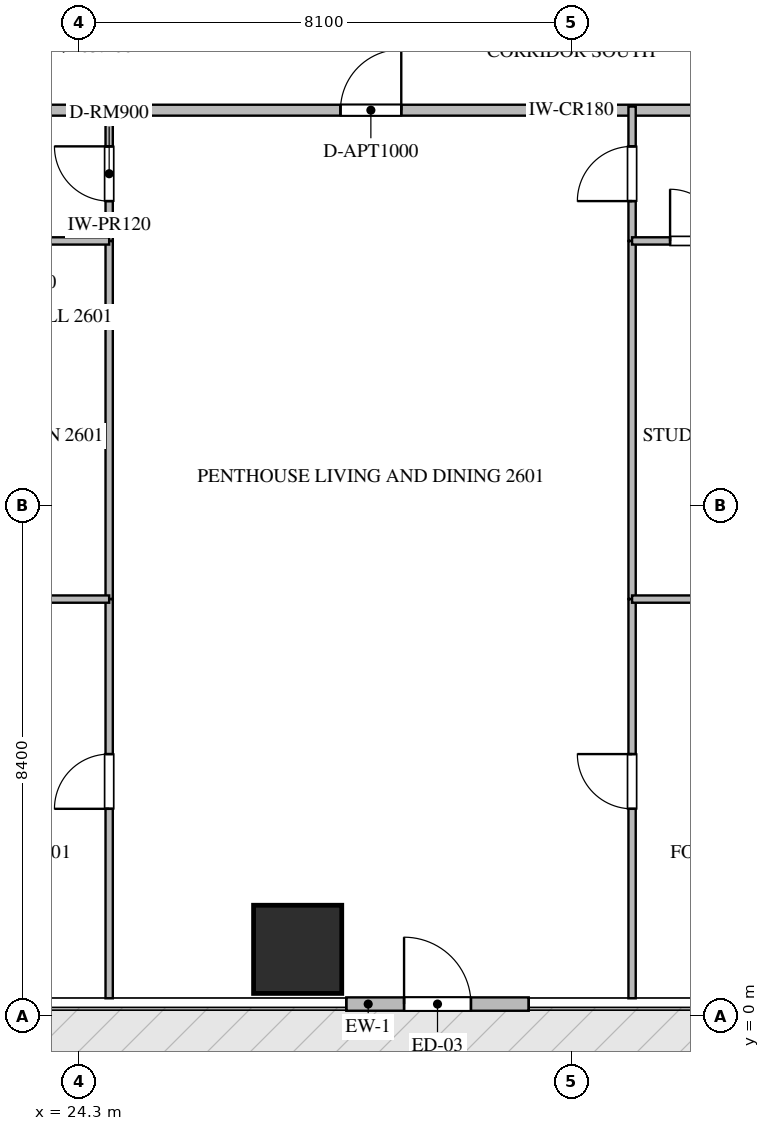
"""IFC4 building model, lengths in metres.
Left out: names, types, materials, properties, quantities, classifications, styles, units other than length and angle.
Written with IfcOpenShell. Run it as: python <this file> out.ifc"""

import sys

from ifc_helpers import new_model, si_unit, direction, frame, frame_2d, origin, origin_2d, place, context, subcontext, project, spatial, rectangle, extrude, source, transform, mapped, element, fill, save


model = new_model("IFC4")
c1 = context("Model", 3, precision=1e-05, world=origin(), true_north=direction((0.0, 1.0)))
c2 = subcontext(c1, "Body", "Model", "MODEL_VIEW")
j1 = project(units=[si_unit("LENGTHUNIT", "METRE"), si_unit("PLANEANGLEUNIT", "RADIAN")], contexts=[c1])
p1 = place(None, origin())
s1 = spatial("IfcSite", under=j1, at=p1, CompositionType="ELEMENT")
p2 = place(p1, origin())
s2 = spatial("IfcBuilding", under=s1, at=p2, CompositionType="ELEMENT")
p3 = place(p2, frame((0.0, 0.0, 105.45)))
s3 = spatial("IfcBuildingStorey", under=s2, at=p3, CompositionType="ELEMENT", Elevation=105.45)
m1 = source(origin(), c2, "Body", "SweptSolid", [
    extrude(rectangle(XDim=1.45, YDim=1.45, at=origin_2d()), origin(), (0.0, 0.0, 1.0), 3.65),
])
p4 = place(p3, frame((27.9, 1.1, -0.26), z_axis=(0.0, 0.0, 1.0), x_axis=(1.0, 0.0, 0.0)))
e1 = element("IfcColumn", 1, at=p4, inside=s3, PredefinedType="COLUMN", context=c2, shape_type="MappedRepresentation", body=[
    mapped(m1, transform((0.0, 0.0, 0.0), scale=1.0)),
])
p5 = place(p3, frame((28.7, 0.2, 0.0), z_axis=(0.0, 0.0, 1.0), x_axis=(1.0, 0.0, 0.0)))
e2 = element("IfcWall", 2, at=p5, inside=s3, PredefinedType="ELEMENTEDWALL", context=c2, shape_type="SweptSolid", body=[
    extrude(rectangle(XDim=3.0, YDim=0.22, at=frame_2d((1.5, 0.0))), origin(), (0.0, 0.0, 1.0), 3.375),
])
p6 = place(p5, frame((0.95, 0.0, 0.0)))
e3 = element("IfcOpeningElement", 3, at=p6, cuts=e2, PredefinedType="OPENING", context=c2, shape_type="SweptSolid", body=[
    extrude(rectangle(XDim=1.1, YDim=2.2, at=frame_2d((0.55, 1.1))), frame((0.0, 0.12, 0.0), z_axis=(0.0, -1.0, 0.0), x_axis=(1.0, 0.0, 0.0)), (0.0, 0.0, 1.0), 0.24),
])
p7 = place(p3, frame((21.402, 14.9, 0.0), z_axis=(0.0, 0.0, 1.0), x_axis=(1.0, 0.0, 0.0)))
e4 = element("IfcWall", 4, at=p7, inside=s3, PredefinedType="PARTITIONING", context=c2, shape_type="SweptSolid", body=[
    extrude(rectangle(XDim=21.996, YDim=0.18, at=frame_2d((10.998, 0.0))), origin(), (0.0, 0.0, 1.0), 3.39),
])
p8 = place(p7, frame((7.202, 0.0, 0.0)))
e5 = element("IfcOpeningElement", 5, at=p8, cuts=e4, PredefinedType="OPENING", context=c2, shape_type="SweptSolid", body=[
    extrude(rectangle(XDim=1.0, YDim=2.15, at=frame_2d((0.5, 1.075))), frame((0.0, 0.1, 0.0), z_axis=(0.0, -1.0, 0.0), x_axis=(1.0, 0.0, 0.0)), (0.0, 0.0, 1.0), 0.2),
])
p9 = place(p3, frame((24.8, 12.75, 0.0), z_axis=(0.0, 0.0, 1.0), x_axis=(0.0, 1.0, 0.0)))
e6 = element("IfcWall", 6, at=p9, inside=s3, PredefinedType="PARTITIONING", context=c2, shape_type="SweptSolid", body=[
    extrude(rectangle(XDim=2.21, YDim=0.12, at=frame_2d((1.105, 0.0))), origin(), (0.0, 0.0, 1.0), 3.39),
])
p10 = place(p9, frame((0.655, 0.0, 0.0)))
e7 = element("IfcOpeningElement", 7, at=p10, cuts=e6, PredefinedType="OPENING", context=c2, shape_type="SweptSolid", body=[
    extrude(rectangle(XDim=0.9, YDim=2.1, at=frame_2d((0.45, 1.05))), frame((0.0, 0.07, 0.0), z_axis=(0.0, -1.0, 0.0), x_axis=(1.0, 0.0, 0.0)), (0.0, 0.0, 1.0), 0.14),
])
p11 = place(p3, frame((24.8, 0.295, 0.0), z_axis=(0.0, 0.0, 1.0), x_axis=(0.0, 1.0, 0.0)))
e8 = element("IfcWall", 8, at=p11, inside=s3, PredefinedType="PARTITIONING", context=c2, shape_type="SweptSolid", body=[
    extrude(rectangle(XDim=6.565, YDim=0.12, at=frame_2d((3.283, 0.0))), origin(), (0.0, 0.0, 1.0), 3.39),
])
p12 = place(p11, frame((3.116, 0.0, 0.0)))
e9 = element("IfcOpeningElement", 9, at=p12, cuts=e8, PredefinedType="OPENING", context=c2, shape_type="SweptSolid", body=[
    extrude(rectangle(XDim=0.9, YDim=2.1, at=frame_2d((0.45, 1.05))), frame((0.0, 0.07, 0.0), z_axis=(0.0, -1.0, 0.0), x_axis=(1.0, 0.0, 0.0)), (0.0, 0.0, 1.0), 0.14),
])
p13 = place(p3, frame((24.8, 6.862, 0.0), z_axis=(0.0, 0.0, 1.0), x_axis=(0.0, 1.0, 0.0)))
e10 = element("IfcWall", 10, at=p13, inside=s3, PredefinedType="PARTITIONING", context=c2, shape_type="SweptSolid", body=[
    extrude(rectangle(XDim=5.886, YDim=0.12, at=frame_2d((2.943, 0.0))), origin(), (0.0, 0.0, 1.0), 3.39),
])
p14 = place(p3, frame((19.65, 6.86, 0.0), z_axis=(0.0, 0.0, 1.0), x_axis=(1.0, 0.0, 0.0)))
e11 = element("IfcWall", 11, at=p14, inside=s3, PredefinedType="PARTITIONING", context=c2, shape_type="SweptSolid", body=[
    extrude(rectangle(XDim=5.15, YDim=0.12, at=frame_2d((2.575, 0.0))), origin(), (0.0, 0.0, 1.0), 3.39),
])
p15 = place(p3, frame((21.752, 12.75, 0.0), z_axis=(0.0, 0.0, 1.0), x_axis=(1.0, 0.0, 0.0)))
e12 = element("IfcWall", 12, at=p15, inside=s3, PredefinedType="PARTITIONING", context=c2, shape_type="SweptSolid", body=[
    extrude(rectangle(XDim=3.048, YDim=0.12, at=frame_2d((1.524, 0.0))), origin(), (0.0, 0.0, 1.0), 3.39),
])
p16 = place(p15, frame((1.099, 0.0, 0.0)))
e13 = element("IfcOpeningElement", 13, at=p16, cuts=e12, PredefinedType="OPENING", context=c2, shape_type="SweptSolid", body=[
    extrude(rectangle(XDim=0.85, YDim=2.1, at=frame_2d((0.425, 1.05))), frame((0.0, 0.07, 0.0), z_axis=(0.0, -1.0, 0.0), x_axis=(1.0, 0.0, 0.0)), (0.0, 0.0, 1.0), 0.14),
])
p17 = place(p3, frame((33.4, 12.75, 0.0), z_axis=(0.0, 0.0, 1.0), x_axis=(0.0, 1.0, 0.0)))
e14 = element("IfcWall", 14, at=p17, inside=s3, PredefinedType="PARTITIONING", context=c2, shape_type="SweptSolid", body=[
    extrude(rectangle(XDim=2.21, YDim=0.12, at=frame_2d((1.105, 0.0))), origin(), (0.0, 0.0, 1.0), 3.39),
])
p18 = place(p17, frame((0.655, 0.0, 0.0)))
e15 = element("IfcOpeningElement", 15, at=p18, cuts=e14, PredefinedType="OPENING", context=c2, shape_type="SweptSolid", body=[
    extrude(rectangle(XDim=0.9, YDim=2.1, at=frame_2d((0.45, 1.05))), frame((0.0, 0.07, 0.0), z_axis=(0.0, -1.0, 0.0), x_axis=(1.0, 0.0, 0.0)), (0.0, 0.0, 1.0), 0.14),
])
p19 = place(p3, frame((33.4, 0.295, 0.0), z_axis=(0.0, 0.0, 1.0), x_axis=(0.0, 1.0, 0.0)))
e16 = element("IfcWall", 16, at=p19, inside=s3, PredefinedType="PARTITIONING", context=c2, shape_type="SweptSolid", body=[
    extrude(rectangle(XDim=6.565, YDim=0.12, at=frame_2d((3.283, 0.0))), origin(), (0.0, 0.0, 1.0), 3.39),
])
p20 = place(p19, frame((3.116, 0.0, 0.0)))
e17 = element("IfcOpeningElement", 17, at=p20, cuts=e16, PredefinedType="OPENING", context=c2, shape_type="SweptSolid", body=[
    extrude(rectangle(XDim=0.9, YDim=2.1, at=frame_2d((0.45, 1.05))), frame((0.0, 0.07, 0.0), z_axis=(0.0, -1.0, 0.0), x_axis=(1.0, 0.0, 0.0)), (0.0, 0.0, 1.0), 0.14),
])
p21 = place(p3, frame((33.4, 6.862, 0.0), z_axis=(0.0, 0.0, 1.0), x_axis=(0.0, 1.0, 0.0)))
e18 = element("IfcWall", 18, at=p21, inside=s3, PredefinedType="PARTITIONING", context=c2, shape_type="SweptSolid", body=[
    extrude(rectangle(XDim=5.886, YDim=0.12, at=frame_2d((2.943, 0.0))), origin(), (0.0, 0.0, 1.0), 3.39),
])
p22 = place(p3, frame((33.4, 6.86, 0.0), z_axis=(0.0, 0.0, 1.0), x_axis=(1.0, 0.0, 0.0)))
e19 = element("IfcWall", 19, at=p22, inside=s3, PredefinedType="PARTITIONING", context=c2, shape_type="SweptSolid", body=[
    extrude(rectangle(XDim=5.15, YDim=0.12, at=frame_2d((2.575, 0.0))), origin(), (0.0, 0.0, 1.0), 3.39),
])
p23 = place(p3, frame((33.4, 12.75, 0.0), z_axis=(0.0, 0.0, 1.0), x_axis=(1.0, 0.0, 0.0)))
e20 = element("IfcWall", 20, at=p23, inside=s3, PredefinedType="PARTITIONING", context=c2, shape_type="SweptSolid", body=[
    extrude(rectangle(XDim=2.1, YDim=0.12, at=frame_2d((1.05, 0.0))), origin(), (0.0, 0.0, 1.0), 3.39),
])
p24 = place(p23, frame((0.625, 0.0, 0.0)))
e21 = element("IfcOpeningElement", 21, at=p24, cuts=e20, PredefinedType="OPENING", context=c2, shape_type="SweptSolid", body=[
    extrude(rectangle(XDim=0.85, YDim=2.1, at=frame_2d((0.425, 1.05))), frame((0.0, 0.07, 0.0), z_axis=(0.0, -1.0, 0.0), x_axis=(1.0, 0.0, 0.0)), (0.0, 0.0, 1.0), 0.14),
])
m2 = source(origin(), c2, "Body", "SweptSolid", [
    extrude(rectangle(XDim=1.1, YDim=2.2, at=frame_2d((0.55, 1.1))), frame((0.0, 0.025, 0.0), z_axis=(0.0, -1.0, 0.0), x_axis=(1.0, 0.0, 0.0)), (0.0, 0.0, 1.0), 0.05),
])
p25 = place(p6, origin())
e22 = element("IfcDoor", 22, at=p25, inside=s3, OperationType="SINGLE_SWING_LEFT", PredefinedType="DOOR", context=c2, shape_type="MappedRepresentation", body=[
    mapped(m2, transform((0.0, 0.0, 0.0), scale=1.0)),
])
fill(e3, e22)
m3 = source(origin(), c2, "Body", "SweptSolid", [
    extrude(rectangle(XDim=1.0, YDim=2.15, at=frame_2d((0.5, 1.075))), frame((0.0, 0.025, 0.0), z_axis=(0.0, -1.0, 0.0), x_axis=(1.0, 0.0, 0.0)), (0.0, 0.0, 1.0), 0.05),
])
p26 = place(p8, origin())
e23 = element("IfcDoor", 23, at=p26, inside=s3, OperationType="SINGLE_SWING_RIGHT", PredefinedType="DOOR", context=c2, shape_type="MappedRepresentation", body=[
    mapped(m3, transform((0.0, 0.0, 0.0), scale=1.0)),
])
fill(e5, e23)
m4 = source(origin(), c2, "Body", "SweptSolid", [
    extrude(rectangle(XDim=0.9, YDim=2.1, at=frame_2d((0.45, 1.05))), frame((0.0, 0.025, 0.0), z_axis=(0.0, -1.0, 0.0), x_axis=(1.0, 0.0, 0.0)), (0.0, 0.0, 1.0), 0.05),
])
p27 = place(p10, origin())
e24 = element("IfcDoor", 24, at=p27, inside=s3, OperationType="SINGLE_SWING_RIGHT", PredefinedType="DOOR", context=c2, shape_type="MappedRepresentation", body=[
    mapped(m4, transform((0.0, 0.0, 0.0), scale=1.0)),
])
fill(e7, e24)
p28 = place(p12, origin())
e25 = element("IfcDoor", 25, at=p28, inside=s3, OperationType="SINGLE_SWING_LEFT", PredefinedType="DOOR", context=c2, shape_type="MappedRepresentation", body=[
    mapped(m4, transform((0.0, 0.0, 0.0), scale=1.0)),
])
fill(e9, e25)
p29 = place(p18, origin())
e26 = element("IfcDoor", 26, at=p29, inside=s3, OperationType="SINGLE_SWING_LEFT", PredefinedType="DOOR", context=c2, shape_type="MappedRepresentation", body=[
    mapped(m4, transform((0.0, 0.0, 0.0), scale=1.0)),
])
fill(e15, e26)
p30 = place(p20, origin())
e27 = element("IfcDoor", 27, at=p30, inside=s3, OperationType="SINGLE_SWING_RIGHT", PredefinedType="DOOR", context=c2, shape_type="MappedRepresentation", body=[
    mapped(m4, transform((0.0, 0.0, 0.0), scale=1.0)),
])
fill(e17, e27)
m5 = source(origin(), c2, "Body", "SweptSolid", [
    extrude(rectangle(XDim=0.85, YDim=2.1, at=frame_2d((0.425, 1.05))), frame((0.0, 0.025, 0.0), z_axis=(0.0, -1.0, 0.0), x_axis=(1.0, 0.0, 0.0)), (0.0, 0.0, 1.0), 0.05),
])
p31 = place(p24, origin())
e28 = element("IfcDoor", 28, at=p31, inside=s3, OperationType="SINGLE_SWING_LEFT", PredefinedType="DOOR", context=c2, shape_type="MappedRepresentation", body=[
    mapped(m5, transform((0.0, 0.0, 0.0), scale=1.0)),
])
fill(e21, e28)
save(model, sys.argv[1])
